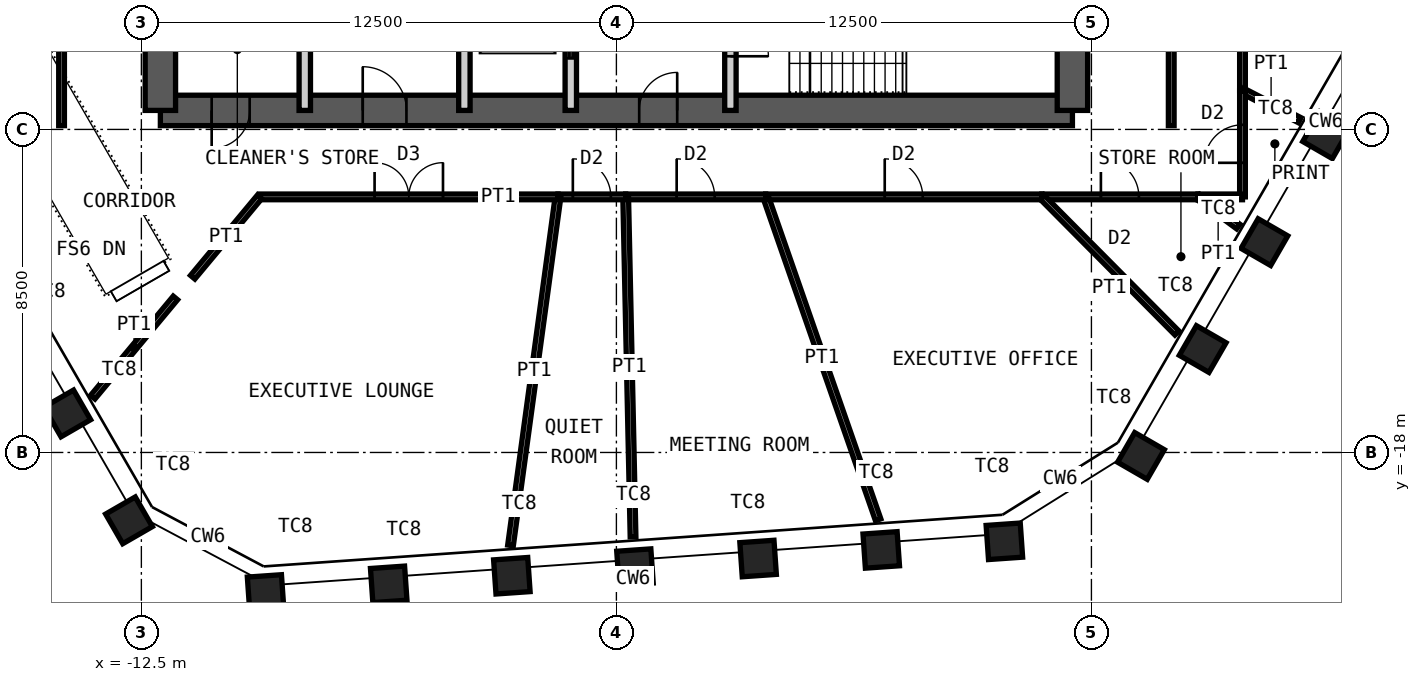
"""IFC4 building model, lengths in metres.
Left out: names, types, materials, properties, quantities, classifications, styles, units other than length and angle.
Written with IfcOpenShell. Run it as: python <this file> out.ifc"""

import sys

from ifc_helpers import new_model, si_unit, direction, frame, frame_2d, origin, origin_2d, place, context, subcontext, project, spatial, rectangle, hollow_rectangle, extrude, element, fill, save


model = new_model("IFC4")
c1 = context("Model", 3, precision=1e-05, world=origin(), true_north=direction((0.0, 1.0)))
c2 = subcontext(c1, "Body", "Model", "MODEL_VIEW")
j1 = project(units=[si_unit("LENGTHUNIT", "METRE"), si_unit("PLANEANGLEUNIT", "RADIAN")], contexts=[c1])
p1 = place(None, origin())
s1 = spatial("IfcSite", under=j1, at=p1, CompositionType="ELEMENT")
p2 = place(p1, origin())
s2 = spatial("IfcBuilding", under=s1, at=p2, CompositionType="ELEMENT")
p3 = place(p2, frame((0.0, 0.0, 333.4)))
s3 = spatial("IfcBuildingStorey", under=s2, at=p3, CompositionType="ELEMENT", Elevation=333.4)
for number, where, z_axis, x_axis in (
    (1, (18.676, -9.653, 0.0), (0.0, 0.0, 1.0), (0.5, 0.866, 0.0)),
    (2, (17.052, -12.466, 0.0), (0.0, 0.0, 1.0), (0.5, 0.866, 0.0)),
    (3, (15.427, -15.279, 0.0), (0.0, 0.0, 1.0), (0.5, 0.866, 0.0)),
    (4, (13.803, -18.092, 0.0), (0.0, 0.0, 1.0), (0.5, 0.866, 0.0)),
    (5, (10.209, -20.337, 0.0), (0.0, 0.0, 1.0), (0.998, 0.07, 0.0)),
    (6, (6.969, -20.564, 0.0), (0.0, 0.0, 1.0), (0.998, 0.07, 0.0)),
    (7, (3.729, -20.791, 0.0), (0.0, 0.0, 1.0), (0.998, 0.07, 0.0)),
    (8, (0.489, -21.017, 0.0), (0.0, 0.0, 1.0), (0.998, 0.07, 0.0)),
    (9, (-2.751, -21.244, 0.0), (0.0, 0.0, 1.0), (0.998, 0.07, 0.0)),
    (10, (-5.991, -21.47, 0.0), (0.0, 0.0, 1.0), (0.998, 0.07, 0.0)),
    (11, (-9.231, -21.697, 0.0), (0.0, 0.0, 1.0), (0.998, 0.07, 0.0)),
    (12, (-12.825, -19.786, 0.0), (0.0, 0.0, 1.0), (0.5, -0.866, 0.0)),
    (13, (-14.449, -16.973, 0.0), (0.0, 0.0, 1.0), (0.5, -0.866, 0.0)),
):
    element("IfcColumn", number, at=place(p3, frame(where, z_axis=z_axis, x_axis=x_axis)), inside=s3, PredefinedType="COLUMN", context=c2, shape_type="SweptSolid", body=[
        extrude(hollow_rectangle(XDim=0.9, YDim=0.9, WallThickness=0.05, at=origin_2d()), origin(), (0.0, 0.0, 1.0), 4.2),
    ])
p4 = place(p3, frame((-12.0, -9.0, 0.0), z_axis=(0.0, 0.0, 1.0), x_axis=(1.0, 0.0, 0.0)))
e14 = element("IfcWall", 14, at=p4, inside=s3, PredefinedType="SHEAR", context=c2, shape_type="SweptSolid", body=[
    extrude(rectangle(XDim=24.0, YDim=0.8, at=frame_2d((12.0, 0.0))), origin(), (0.0, 0.0, 1.0), 4.2),
])
p5 = place(p4, frame((1.35, 0.0, 0.0)))
e15 = element("IfcOpeningElement", 15, at=p5, cuts=e14, PredefinedType="OPENING", context=c2, shape_type="SweptSolid", body=[
    extrude(rectangle(XDim=1.0, YDim=2.1, at=frame_2d((0.5, 1.05))), frame((0.0, 0.41, 0.0), z_axis=(0.0, -1.0, 0.0), x_axis=(1.0, 0.0, 0.0)), (0.0, 0.0, 1.0), 0.82),
])
p6 = place(p4, frame((5.325, 0.0, 0.0)))
e16 = element("IfcOpeningElement", 16, at=p6, cuts=e14, PredefinedType="OPENING", context=c2, shape_type="SweptSolid", body=[
    extrude(rectangle(XDim=1.15, YDim=2.1, at=frame_2d((0.575, 1.05))), frame((0.0, 0.41, 0.0), z_axis=(0.0, -1.0, 0.0), x_axis=(1.0, 0.0, 0.0)), (0.0, 0.0, 1.0), 0.82),
])
p7 = place(p4, frame((12.6, 0.0, 0.0)))
e17 = element("IfcOpeningElement", 17, at=p7, cuts=e14, PredefinedType="OPENING", context=c2, shape_type="SweptSolid", body=[
    extrude(rectangle(XDim=1.0, YDim=2.1, at=frame_2d((0.5, 1.05))), frame((0.0, 0.41, 0.0), z_axis=(0.0, -1.0, 0.0), x_axis=(1.0, 0.0, 0.0)), (0.0, 0.0, 1.0), 0.82),
])
p8 = place(p3, frame((12.0, -9.0, 0.0), z_axis=(0.0, 0.0, 1.0), x_axis=(0.0, 1.0, 0.0)))
e18 = element("IfcWall", 18, at=p8, inside=s3, PredefinedType="SHEAR", context=c2, shape_type="SweptSolid", body=[
    extrude(rectangle(XDim=18.0, YDim=0.8, at=frame_2d((9.0, 0.0))), origin(), (0.0, 0.0, 1.0), 4.2),
])
p9 = place(p8, frame((8.1, 0.0, 0.0)))
e19 = element("IfcOpeningElement", 19, at=p9, cuts=e18, PredefinedType="OPENING", context=c2, shape_type="SweptSolid", body=[
    extrude(rectangle(XDim=1.8, YDim=2.1, at=frame_2d((0.9, 1.05))), frame((0.0, 0.41, 0.0), z_axis=(0.0, -1.0, 0.0), x_axis=(1.0, 0.0, 0.0)), (0.0, 0.0, 1.0), 0.82),
])
p10 = place(p3, frame((-12.0, -9.0, 0.0), z_axis=(0.0, 0.0, 1.0), x_axis=(0.0, 1.0, 0.0)))
e20 = element("IfcWall", 20, at=p10, inside=s3, PredefinedType="SHEAR", context=c2, shape_type="SweptSolid", body=[
    extrude(rectangle(XDim=18.0, YDim=0.8, at=frame_2d((9.0, 0.0))), origin(), (0.0, 0.0, 1.0), 4.2),
])
p11 = place(p10, frame((8.1, 0.0, 0.0)))
e21 = element("IfcOpeningElement", 21, at=p11, cuts=e20, PredefinedType="OPENING", context=c2, shape_type="SweptSolid", body=[
    extrude(rectangle(XDim=1.8, YDim=2.1, at=frame_2d((0.9, 1.05))), frame((0.0, 0.41, 0.0), z_axis=(0.0, -1.0, 0.0), x_axis=(1.0, 0.0, 0.0)), (0.0, 0.0, 1.0), 0.82),
])
for number, where, z_axis, x_axis in (
    (22, (-8.2, -9.0, 0.0), (0.0, 0.0, 1.0), (0.0, 1.0, 0.0)),
    (23, (-4.0, -9.0, 0.0), (0.0, 0.0, 1.0), (0.0, 1.0, 0.0)),
):
    element("IfcWall", number, at=place(p3, frame(where, z_axis=z_axis, x_axis=x_axis)), inside=s3, PredefinedType="PARTITIONING", context=c2, shape_type="SweptSolid", body=[
        extrude(rectangle(XDim=3.85, YDim=0.3, at=frame_2d((1.925, 0.0))), origin(), (0.0, 0.0, 1.0), 3.98),
    ])
p12 = place(p3, frame((-1.2, -9.0, 0.0), z_axis=(0.0, 0.0, 1.0), x_axis=(0.0, 1.0, 0.0)))
e24 = element("IfcWall", 24, at=p12, inside=s3, PredefinedType="PARTITIONING", context=c2, shape_type="SweptSolid", body=[
    extrude(rectangle(XDim=3.85, YDim=0.3, at=frame_2d((1.925, 0.0))), origin(), (0.0, 0.0, 1.0), 3.98),
])
p13 = place(p12, frame((1.375, 0.0, 0.0)))
e25 = element("IfcOpeningElement", 25, at=p13, cuts=e24, PredefinedType="OPENING", context=c2, shape_type="SweptSolid", body=[
    extrude(rectangle(XDim=1.1, YDim=2.4, at=frame_2d((0.55, 1.2))), frame((0.0, 0.16, 0.0), z_axis=(0.0, -1.0, 0.0), x_axis=(1.0, 0.0, 0.0)), (0.0, 0.0, 1.0), 0.32),
])
p14 = place(p3, frame((3.0, -9.0, 0.0), z_axis=(0.0, 0.0, 1.0), x_axis=(0.0, 1.0, 0.0)))
e26 = element("IfcWall", 26, at=p14, inside=s3, PredefinedType="PARTITIONING", context=c2, shape_type="SweptSolid", body=[
    extrude(rectangle(XDim=3.85, YDim=0.3, at=frame_2d((1.925, 0.0))), origin(), (0.0, 0.0, 1.0), 3.98),
])
p15 = place(p14, frame((1.425, 0.0, 0.0)))
e27 = element("IfcOpeningElement", 27, at=p15, cuts=e26, PredefinedType="OPENING", context=c2, shape_type="SweptSolid", body=[
    extrude(rectangle(XDim=1.0, YDim=2.1, at=frame_2d((0.5, 1.05))), frame((0.0, 0.16, 0.0), z_axis=(0.0, -1.0, 0.0), x_axis=(1.0, 0.0, 0.0)), (0.0, 0.0, 1.0), 0.32),
])
p16 = place(p3, frame((16.475, -2.842, 0.0), z_axis=(0.0, 0.0, 1.0), x_axis=(0.0, -1.0, 0.0)))
e28 = element("IfcWall", 28, at=p16, inside=s3, PredefinedType="PARTITIONING", context=c2, shape_type="SweptSolid", body=[
    extrude(rectangle(XDim=5.64, YDim=0.15, at=frame_2d((2.82, 0.0))), origin(), (0.0, 0.0, 1.0), 3.92),
])
p17 = place(p16, frame((2.32, 0.0, 0.0)))
e29 = element("IfcOpeningElement", 29, at=p17, cuts=e28, PredefinedType="OPENING", context=c2, shape_type="SweptSolid", body=[
    extrude(rectangle(XDim=1.0, YDim=2.4, at=frame_2d((0.5, 1.2))), frame((0.0, 0.085, 0.0), z_axis=(0.0, -1.0, 0.0), x_axis=(1.0, 0.0, 0.0)), (0.0, 0.0, 1.0), 0.17),
])
p18 = place(p3, frame((17.98, -9.257, 0.0), z_axis=(0.0, 0.0, 1.0), x_axis=(-0.889058145064, 0.457794292991, 0.0)))
e30 = element("IfcWall", 30, at=p18, inside=s3, PredefinedType="PARTITIONING", context=c2, shape_type="SweptSolid", body=[
    extrude(rectangle(XDim=1.693, YDim=0.15, at=frame_2d((0.847, 0.0))), origin(), (0.0, 0.0, 1.0), 2.72),
])
p19 = place(p3, frame((16.475, -8.482, 0.0), z_axis=(0.0, 0.0, 1.0), x_axis=(0.0, -1.0, 0.0)))
e31 = element("IfcWall", 31, at=p19, inside=s3, PredefinedType="PARTITIONING", context=c2, shape_type="SweptSolid", body=[
    extrude(rectangle(XDim=2.793, YDim=0.15, at=frame_2d((1.396, 0.0))), origin(), (0.0, 0.0, 1.0), 3.92),
])
p20 = place(p19, frame((0.896, 0.0, 0.0)))
e32 = element("IfcOpeningElement", 32, at=p20, cuts=e31, PredefinedType="OPENING", context=c2, shape_type="SweptSolid", body=[
    extrude(rectangle(XDim=1.0, YDim=2.4, at=frame_2d((0.5, 1.2))), frame((0.0, 0.085, 0.0), z_axis=(0.0, -1.0, 0.0), x_axis=(1.0, 0.0, 0.0)), (0.0, 0.0, 1.0), 0.17),
])
p21 = place(p3, frame((16.475, -11.275, 0.0), z_axis=(0.0, 0.0, 1.0), x_axis=(-1.0, 0.0, 0.0)))
e33 = element("IfcWall", 33, at=p21, inside=s3, PredefinedType="PARTITIONING", context=c2, shape_type="SweptSolid", body=[
    extrude(rectangle(XDim=1.171, YDim=0.15, at=frame_2d((0.585, 0.0))), origin(), (0.0, 0.0, 1.0), 3.92),
])
p22 = place(p3, frame((16.365, -12.056, 0.0), z_axis=(0.0, 0.0, 1.0), x_axis=(-0.805107064944, 0.593129508604, 0.0)))
e34 = element("IfcWall", 34, at=p22, inside=s3, PredefinedType="PARTITIONING", context=c2, shape_type="SweptSolid", body=[
    extrude(rectangle(XDim=1.318, YDim=0.15, at=frame_2d((0.659, 0.0))), origin(), (0.0, 0.0, 1.0), 3.02),
])
p23 = place(p3, frame((15.304, -11.275, 0.0), z_axis=(0.0, 0.0, 1.0), x_axis=(-1.0, 0.0, 0.0)))
e35 = element("IfcWall", 35, at=p23, inside=s3, PredefinedType="PARTITIONING", context=c2, shape_type="SweptSolid", body=[
    extrude(rectangle(XDim=4.11, YDim=0.15, at=frame_2d((2.055, 0.0))), origin(), (0.0, 0.0, 1.0), 3.92),
])
p24 = place(p23, frame((1.555, 0.0, 0.0)))
e36 = element("IfcOpeningElement", 36, at=p24, cuts=e35, PredefinedType="OPENING", context=c2, shape_type="SweptSolid", body=[
    extrude(rectangle(XDim=1.0, YDim=2.4, at=frame_2d((0.5, 1.2))), frame((0.0, 0.085, 0.0), z_axis=(0.0, -1.0, 0.0), x_axis=(1.0, 0.0, 0.0)), (0.0, 0.0, 1.0), 0.17),
])
p25 = place(p3, frame((14.751, -14.858, 0.0), z_axis=(0.0, 0.0, 1.0), x_axis=(-0.704539120613, 0.709665151692, 0.0)))
e37 = element("IfcWall", 37, at=p25, inside=s3, PredefinedType="PARTITIONING", context=c2, shape_type="SweptSolid", body=[
    extrude(rectangle(XDim=5.049, YDim=0.15, at=frame_2d((2.524, 0.0))), origin(), (0.0, 0.0, 1.0), 2.72),
])
p26 = place(p3, frame((11.194, -11.275, 0.0), z_axis=(0.0, 0.0, 1.0), x_axis=(-1.0, 0.0, 0.0)))
e38 = element("IfcWall", 38, at=p26, inside=s3, PredefinedType="PARTITIONING", context=c2, shape_type="SweptSolid", body=[
    extrude(rectangle(XDim=7.266, YDim=0.15, at=frame_2d((3.633, 0.0))), origin(), (0.0, 0.0, 1.0), 3.92),
])
p27 = place(p26, frame((3.133, 0.0, 0.0)))
e39 = element("IfcOpeningElement", 39, at=p27, cuts=e38, PredefinedType="OPENING", context=c2, shape_type="SweptSolid", body=[
    extrude(rectangle(XDim=1.0, YDim=2.4, at=frame_2d((0.5, 1.2))), frame((0.0, 0.085, 0.0), z_axis=(0.0, -1.0, 0.0), x_axis=(1.0, 0.0, 0.0)), (0.0, 0.0, 1.0), 0.17),
])
p28 = place(p3, frame((6.888, -19.771, 0.0), z_axis=(0.0, 0.0, 1.0), x_axis=(-0.328987878601, 0.944334144111, 0.0)))
e40 = element("IfcWall", 40, at=p28, inside=s3, PredefinedType="PARTITIONING", context=c2, shape_type="SweptSolid", body=[
    extrude(rectangle(XDim=8.997, YDim=0.15, at=frame_2d((4.499, 0.0))), origin(), (0.0, 0.0, 1.0), 3.02),
])
p29 = place(p3, frame((3.928, -11.275, 0.0), z_axis=(0.0, 0.0, 1.0), x_axis=(-1.0, 0.0, 0.0)))
e41 = element("IfcWall", 41, at=p29, inside=s3, PredefinedType="PARTITIONING", context=c2, shape_type="SweptSolid", body=[
    extrude(rectangle(XDim=3.683, YDim=0.15, at=frame_2d((1.842, 0.0))), origin(), (0.0, 0.0, 1.0), 3.92),
])
p30 = place(p29, frame((1.342, 0.0, 0.0)))
e42 = element("IfcOpeningElement", 42, at=p30, cuts=e41, PredefinedType="OPENING", context=c2, shape_type="SweptSolid", body=[
    extrude(rectangle(XDim=1.0, YDim=2.4, at=frame_2d((0.5, 1.2))), frame((0.0, 0.085, 0.0), z_axis=(0.0, -1.0, 0.0), x_axis=(1.0, 0.0, 0.0)), (0.0, 0.0, 1.0), 0.17),
])
p31 = place(p3, frame((0.438, -20.219, 0.0), z_axis=(0.0, 0.0, 1.0), x_axis=(-0.021641488123, 0.99976579557, 0.0)))
e43 = element("IfcWall", 43, at=p31, inside=s3, PredefinedType="PARTITIONING", context=c2, shape_type="SweptSolid", body=[
    extrude(rectangle(XDim=8.946, YDim=0.15, at=frame_2d((4.473, 0.0))), origin(), (0.0, 0.0, 1.0), 3.02),
])
p32 = place(p3, frame((0.244, -11.275, 0.0), z_axis=(0.0, 0.0, 1.0), x_axis=(-1.0, 0.0, 0.0)))
e44 = element("IfcWall", 44, at=p32, inside=s3, PredefinedType="PARTITIONING", context=c2, shape_type="SweptSolid", body=[
    extrude(rectangle(XDim=1.781, YDim=0.15, at=frame_2d((0.891, 0.0))), origin(), (0.0, 0.0, 1.0), 3.92),
])
p33 = place(p32, frame((0.39, 0.0, 0.0)))
e45 = element("IfcOpeningElement", 45, at=p33, cuts=e44, PredefinedType="OPENING", context=c2, shape_type="SweptSolid", body=[
    extrude(rectangle(XDim=1.0, YDim=2.4, at=frame_2d((0.5, 1.2))), frame((0.0, 0.085, 0.0), z_axis=(0.0, -1.0, 0.0), x_axis=(1.0, 0.0, 0.0)), (0.0, 0.0, 1.0), 0.17),
])
p34 = place(p3, frame((-2.786, -20.446, 0.0), z_axis=(0.0, 0.0, 1.0), x_axis=(0.13501904213, 0.990843003842, 0.0)))
e46 = element("IfcWall", 46, at=p34, inside=s3, PredefinedType="PARTITIONING", context=c2, shape_type="SweptSolid", body=[
    extrude(rectangle(XDim=9.256, YDim=0.15, at=frame_2d((4.628, 0.0))), origin(), (0.0, 0.0, 1.0), 2.72),
])
p35 = place(p3, frame((-1.537, -11.275, 0.0), z_axis=(0.0, 0.0, 1.0), x_axis=(-1.0, 0.0, 0.0)))
e47 = element("IfcWall", 47, at=p35, inside=s3, PredefinedType="PARTITIONING", context=c2, shape_type="SweptSolid", body=[
    extrude(rectangle(XDim=7.853, YDim=0.15, at=frame_2d((3.927, 0.0))), origin(), (0.0, 0.0, 1.0), 3.92),
])
p36 = place(p35, frame((3.027, 0.0, 0.0)))
e48 = element("IfcOpeningElement", 48, at=p36, cuts=e47, PredefinedType="OPENING", context=c2, shape_type="SweptSolid", body=[
    extrude(rectangle(XDim=1.8, YDim=2.4, at=frame_2d((0.9, 1.2))), frame((0.0, 0.085, 0.0), z_axis=(0.0, -1.0, 0.0), x_axis=(1.0, 0.0, 0.0)), (0.0, 0.0, 1.0), 0.17),
])
p37 = place(p3, frame((-13.779, -16.546, 0.0), z_axis=(0.0, 0.0, 1.0), x_axis=(0.639937109246, 0.768427287523, 0.0)))
e49 = element("IfcWall", 49, at=p37, inside=s3, PredefinedType="PARTITIONING", context=c2, shape_type="SweptSolid", body=[
    extrude(rectangle(XDim=3.399, YDim=0.15, at=frame_2d((1.7, 0.0))), origin(), (0.0, 0.0, 1.0), 2.72),
])
p38 = place(p3, frame((-11.15, -13.389, 0.0), z_axis=(0.0, 0.0, 1.0), x_axis=(0.639931226982, 0.768432186165, 0.0)))
e50 = element("IfcWall", 50, at=p38, inside=s3, PredefinedType="PARTITIONING", context=c2, shape_type="SweptSolid", body=[
    extrude(rectangle(XDim=2.751, YDim=0.15, at=frame_2d((1.375, 0.0))), origin(), (0.0, 0.0, 1.0), 2.72),
])
for number, where, z_axis, x_axis in (
    (51, (14.6, -9.4, 0.0), (0.0, 0.0, 1.0), (0.0, 1.0, 0.0)),
    (52, (-14.6, -9.4, 0.0), (0.0, 0.0, 1.0), (0.0, 1.0, 0.0)),
):
    element("IfcWall", number, at=place(p3, frame(where, z_axis=z_axis, x_axis=x_axis)), inside=s3, PredefinedType="PARTITIONING", context=c2, shape_type="SweptSolid", body=[
        extrude(rectangle(XDim=6.9, YDim=0.15, at=frame_2d((3.45, 0.0))), origin(), (0.0, 0.0, 1.0), 3.92),
    ])
p39 = place(p5, origin())
e53 = element("IfcDoor", 53, at=p39, inside=s3, OperationType="SINGLE_SWING_LEFT", PredefinedType="DOOR", context=c2, shape_type="SweptSolid", body=[
    extrude(rectangle(XDim=1.0, YDim=2.1, at=frame_2d((0.5, 1.05))), frame((0.0, 0.025, 0.0), z_axis=(0.0, -1.0, 0.0), x_axis=(1.0, 0.0, 0.0)), (0.0, 0.0, 1.0), 0.05),
])
fill(e15, e53)
p40 = place(p6, origin())
e54 = element("IfcDoor", 54, at=p40, inside=s3, OperationType="SINGLE_SWING_RIGHT", PredefinedType="DOOR", context=c2, shape_type="SweptSolid", body=[
    extrude(rectangle(XDim=1.15, YDim=2.1, at=frame_2d((0.575, 1.05))), frame((0.0, 0.025, 0.0), z_axis=(0.0, -1.0, 0.0), x_axis=(1.0, 0.0, 0.0)), (0.0, 0.0, 1.0), 0.05),
])
fill(e16, e54)
p41 = place(p7, origin())
e55 = element("IfcDoor", 55, at=p41, inside=s3, OperationType="SINGLE_SWING_LEFT", PredefinedType="DOOR", context=c2, shape_type="SweptSolid", body=[
    extrude(rectangle(XDim=1.0, YDim=2.1, at=frame_2d((0.5, 1.05))), frame((0.0, 0.025, 0.0), z_axis=(0.0, -1.0, 0.0), x_axis=(1.0, 0.0, 0.0)), (0.0, 0.0, 1.0), 0.05),
])
fill(e17, e55)
p42 = place(p15, origin())
e56 = element("IfcDoor", 56, at=p42, inside=s3, OperationType="SINGLE_SWING_LEFT", PredefinedType="DOOR", context=c2, shape_type="SweptSolid", body=[
    extrude(rectangle(XDim=1.0, YDim=2.1, at=frame_2d((0.5, 1.05))), frame((0.0, 0.025, 0.0), z_axis=(0.0, -1.0, 0.0), x_axis=(1.0, 0.0, 0.0)), (0.0, 0.0, 1.0), 0.05),
])
fill(e27, e56)
p43 = place(p13, origin())
e57 = element("IfcDoor", 57, at=p43, inside=s3, OperationType="DOUBLE_DOOR_SLIDING", PredefinedType="DOOR", context=c2, shape_type="SweptSolid", body=[
    extrude(rectangle(XDim=1.1, YDim=2.4, at=frame_2d((0.55, 1.2))), frame((0.0, 0.025, 0.0), z_axis=(0.0, -1.0, 0.0), x_axis=(1.0, 0.0, 0.0)), (0.0, 0.0, 1.0), 0.05),
])
fill(e25, e57)
p44 = place(p20, origin())
e58 = element("IfcDoor", 58, at=p44, inside=s3, OperationType="SINGLE_SWING_RIGHT", PredefinedType="DOOR", context=c2, shape_type="SweptSolid", body=[
    extrude(rectangle(XDim=1.0, YDim=2.4, at=frame_2d((0.5, 1.2))), frame((0.0, 0.025, 0.0), z_axis=(0.0, -1.0, 0.0), x_axis=(1.0, 0.0, 0.0)), (0.0, 0.0, 1.0), 0.05),
])
fill(e32, e58)
p45 = place(p24, origin())
e59 = element("IfcDoor", 59, at=p45, inside=s3, OperationType="SINGLE_SWING_RIGHT", PredefinedType="DOOR", context=c2, shape_type="SweptSolid", body=[
    extrude(rectangle(XDim=1.0, YDim=2.4, at=frame_2d((0.5, 1.2))), frame((0.0, 0.025, 0.0), z_axis=(0.0, -1.0, 0.0), x_axis=(1.0, 0.0, 0.0)), (0.0, 0.0, 1.0), 0.05),
])
fill(e36, e59)
p46 = place(p27, origin())
e60 = element("IfcDoor", 60, at=p46, inside=s3, OperationType="SINGLE_SWING_RIGHT", PredefinedType="DOOR", context=c2, shape_type="SweptSolid", body=[
    extrude(rectangle(XDim=1.0, YDim=2.4, at=frame_2d((0.5, 1.2))), frame((0.0, 0.025, 0.0), z_axis=(0.0, -1.0, 0.0), x_axis=(1.0, 0.0, 0.0)), (0.0, 0.0, 1.0), 0.05),
])
fill(e39, e60)
p47 = place(p30, origin())
e61 = element("IfcDoor", 61, at=p47, inside=s3, OperationType="SINGLE_SWING_RIGHT", PredefinedType="DOOR", context=c2, shape_type="SweptSolid", body=[
    extrude(rectangle(XDim=1.0, YDim=2.4, at=frame_2d((0.5, 1.2))), frame((0.0, 0.025, 0.0), z_axis=(0.0, -1.0, 0.0), x_axis=(1.0, 0.0, 0.0)), (0.0, 0.0, 1.0), 0.05),
])
fill(e42, e61)
p48 = place(p33, origin())
e62 = element("IfcDoor", 62, at=p48, inside=s3, OperationType="SINGLE_SWING_RIGHT", PredefinedType="DOOR", context=c2, shape_type="SweptSolid", body=[
    extrude(rectangle(XDim=1.0, YDim=2.4, at=frame_2d((0.5, 1.2))), frame((0.0, 0.025, 0.0), z_axis=(0.0, -1.0, 0.0), x_axis=(1.0, 0.0, 0.0)), (0.0, 0.0, 1.0), 0.05),
])
fill(e45, e62)
p49 = place(p36, origin())
e63 = element("IfcDoor", 63, at=p49, inside=s3, OperationType="DOUBLE_DOOR_DOUBLE_SWING", PredefinedType="DOOR", context=c2, shape_type="SweptSolid", body=[
    extrude(rectangle(XDim=1.8, YDim=2.4, at=frame_2d((0.9, 1.2))), frame((0.0, 0.025, 0.0), z_axis=(0.0, -1.0, 0.0), x_axis=(1.0, 0.0, 0.0)), (0.0, 0.0, 1.0), 0.05),
])
fill(e48, e63)
save(model, sys.argv[1])
